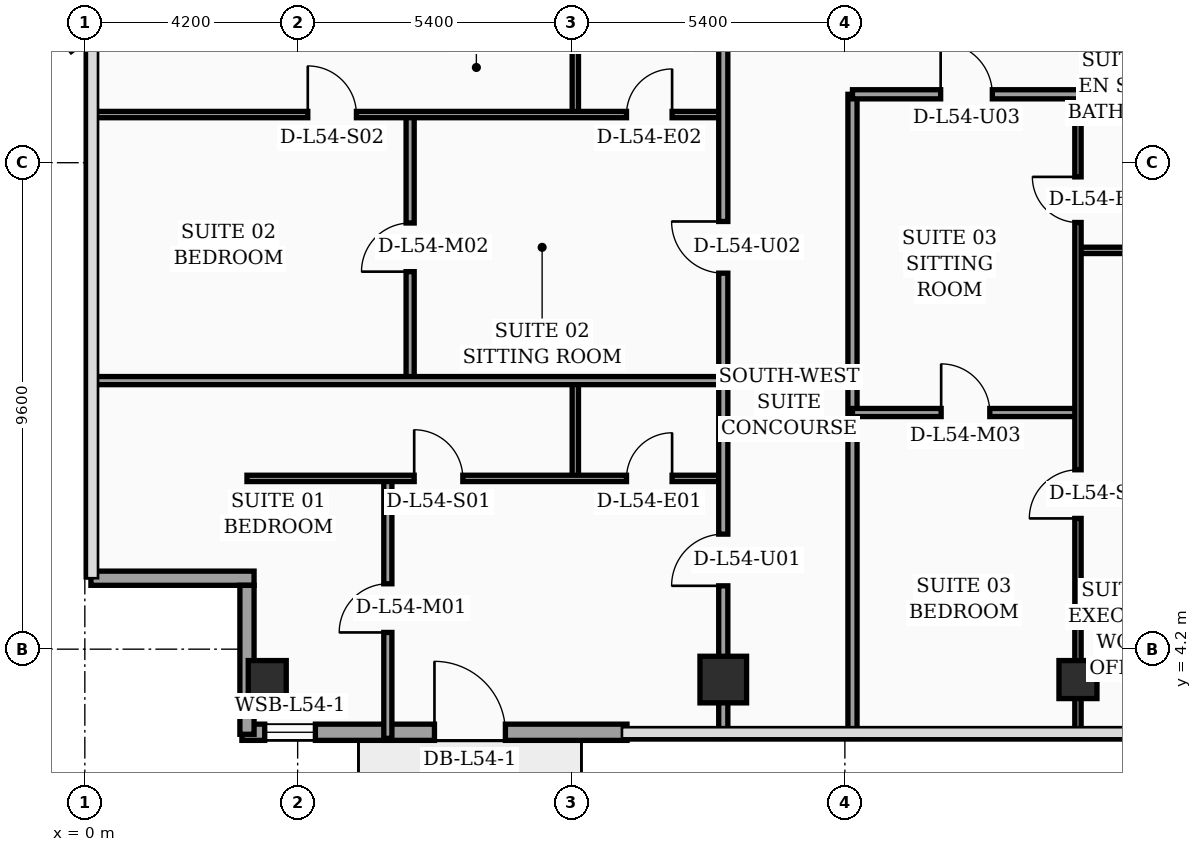
"""IFC4 building model, lengths in metres.
Left out: names, types, materials, properties, quantities, classifications, styles, units other than length and angle.
Written with IfcOpenShell. Run it as: python <this file> out.ifc"""

import sys

from ifc_helpers import new_model, si_unit, direction, frame, frame_2d, origin, origin_2d, place, context, subcontext, project, spatial, rectangle, hollow_rectangle, extrude, element, fill, save


model = new_model("IFC4")
c1 = context("Model", 3, precision=1e-05, world=origin(), true_north=direction((0.0, 1.0)))
c2 = subcontext(c1, "Body", "Model", "MODEL_VIEW")
j1 = project(units=[si_unit("LENGTHUNIT", "METRE"), si_unit("PLANEANGLEUNIT", "RADIAN")], contexts=[c1])
p1 = place(None, origin())
s1 = spatial("IfcSite", under=j1, at=p1, CompositionType="ELEMENT")
p2 = place(p1, origin())
s2 = spatial("IfcBuilding", under=s1, at=p2, CompositionType="ELEMENT")
p3 = place(p2, frame((0.0, 0.0, 219.3)))
s3 = spatial("IfcBuildingStorey", under=s2, at=p3, CompositionType="ELEMENT", Elevation=219.3)
p4 = place(p3, frame((3.6, 3.6, 0.0), z_axis=(0.0, 0.0, 1.0), x_axis=(1.0, 0.0, 0.0)))
e1 = element("IfcColumn", 1, at=p4, inside=s3, PredefinedType="COLUMN", context=c2, shape_type="SweptSolid", body=[
    extrude(hollow_rectangle(XDim=0.75, YDim=0.75, WallThickness=0.032, at=origin_2d()), origin(), (0.0, 0.0, 1.0), 3.56),
])
p5 = place(p3, frame((12.6, 3.6, 0.0), z_axis=(0.0, 0.0, 1.0), x_axis=(1.0, 0.0, 0.0)))
e2 = element("IfcColumn", 2, at=p5, inside=s3, PredefinedType="COLUMN", context=c2, shape_type="SweptSolid", body=[
    extrude(rectangle(XDim=0.92, YDim=0.92, at=origin_2d()), origin(), (0.0, 0.0, 1.0), 3.56),
])
p6 = place(p3, frame((19.6, 3.6, 0.0), z_axis=(0.0, 0.0, 1.0), x_axis=(1.0, 0.0, 0.0)))
e3 = element("IfcColumn", 3, at=p6, inside=s3, PredefinedType="COLUMN", context=c2, shape_type="SweptSolid", body=[
    extrude(hollow_rectangle(XDim=0.75, YDim=0.75, WallThickness=0.032, at=origin_2d()), origin(), (0.0, 0.0, 1.0), 3.56),
])
p7 = place(p3, frame((3.1, 2.56, 0.0), z_axis=(0.0, 0.0, 1.0), x_axis=(1.0, 0.0, 0.0)))
e4 = element("IfcWall", 4, at=p7, inside=s3, PredefinedType="SOLIDWALL", context=c2, shape_type="SweptSolid", body=[
    extrude(rectangle(XDim=7.6, YDim=0.32, at=frame_2d((3.8, 0.0))), origin(), (0.0, 0.0, 1.0), 3.56),
])
p8 = place(p7, frame((0.45, 0.0, 0.75)))
e5 = element("IfcOpeningElement", 5, at=p8, cuts=e4, PredefinedType="OPENING", context=c2, shape_type="SweptSolid", body=[
    extrude(rectangle(XDim=1.0, YDim=1.6, at=frame_2d((0.5, 0.8))), frame((0.0, 0.17, 0.0), z_axis=(0.0, -1.0, 0.0), x_axis=(1.0, 0.0, 0.0)), (0.0, 0.0, 1.0), 0.34),
])
p9 = place(p7, frame((3.8, 0.0, 0.0)))
e6 = element("IfcOpeningElement", 6, at=p9, cuts=e4, PredefinedType="OPENING", context=c2, shape_type="SweptSolid", body=[
    extrude(rectangle(XDim=1.4, YDim=2.25, at=frame_2d((0.7, 1.125))), frame((0.0, 0.17, 0.0), z_axis=(0.0, -1.0, 0.0), x_axis=(1.0, 0.0, 0.0)), (0.0, 0.0, 1.0), 0.34),
])
p10 = place(p3, frame((0.12, 5.6, 0.0), z_axis=(0.0, 0.0, 1.0), x_axis=(1.0, 0.0, 0.0)))
e7 = element("IfcWall", 7, at=p10, inside=s3, PredefinedType="SOLIDWALL", context=c2, shape_type="SweptSolid", body=[
    extrude(rectangle(XDim=3.22, YDim=0.28, at=frame_2d((1.61, 0.0))), origin(), (0.0, 0.0, 1.0), 2.94),
])
p11 = place(p3, frame((3.2, 5.46, 0.0), z_axis=(0.0, 0.0, 1.0), x_axis=(0.0, -1.0, 0.0)))
e8 = element("IfcWall", 8, at=p11, inside=s3, PredefinedType="SOLIDWALL", context=c2, shape_type="SweptSolid", body=[
    extrude(rectangle(XDim=2.94, YDim=0.28, at=frame_2d((1.47, 0.0))), origin(), (0.0, 0.0, 1.0), 2.94),
])
p12 = place(p3, frame((9.68, 7.57, 0.0), z_axis=(0.0, 0.0, 1.0), x_axis=(0.0, 1.0, 0.0)))
e9 = element("IfcWall", 9, at=p12, inside=s3, PredefinedType="PARTITIONING", context=c2, shape_type="SweptSolid", body=[
    extrude(rectangle(XDim=1.93, YDim=0.125, at=frame_2d((0.965, 0.0))), origin(), (0.0, 0.0, 1.0), 3.09),
])
p13 = place(p3, frame((5.98, 2.44, 0.0), z_axis=(0.0, 0.0, 1.0), x_axis=(0.0, 1.0, 0.0)))
e10 = element("IfcWall", 10, at=p13, inside=s3, PredefinedType="PARTITIONING", context=c2, shape_type="SweptSolid", body=[
    extrude(rectangle(XDim=5.13, YDim=0.16, at=frame_2d((2.565, 0.0))), origin(), (0.0, 0.0, 1.0), 3.09),
])
p14 = place(p13, frame((2.09, 0.0, 0.0)))
e11 = element("IfcOpeningElement", 11, at=p14, cuts=e10, PredefinedType="OPENING", context=c2, shape_type="SweptSolid", body=[
    extrude(rectangle(XDim=0.96, YDim=2.2, at=frame_2d((0.48, 1.1))), frame((0.0, 0.09, 0.0), z_axis=(0.0, -1.0, 0.0), x_axis=(1.0, 0.0, 0.0)), (0.0, 0.0, 1.0), 0.18),
])
p15 = place(p3, frame((3.2, 7.57, 0.0), z_axis=(0.0, 0.0, 1.0), x_axis=(1.0, 0.0, 0.0)))
e12 = element("IfcWall", 12, at=p15, inside=s3, PredefinedType="PARTITIONING", context=c2, shape_type="SweptSolid", body=[
    extrude(rectangle(XDim=9.4, YDim=0.125, at=frame_2d((4.7, 0.0))), origin(), (0.0, 0.0, 1.0), 2.94),
])
p16 = place(p15, frame((3.3, 0.0, 0.0)))
e13 = element("IfcOpeningElement", 13, at=p16, cuts=e12, PredefinedType="OPENING", context=c2, shape_type="SweptSolid", body=[
    extrude(rectangle(XDim=0.96, YDim=2.2, at=frame_2d((0.48, 1.1))), frame((0.0, 0.073, 0.0), z_axis=(0.0, -1.0, 0.0), x_axis=(1.0, 0.0, 0.0)), (0.0, 0.0, 1.0), 0.145),
])
p17 = place(p15, frame((7.49, 0.0, 0.0)))
e14 = element("IfcOpeningElement", 14, at=p17, cuts=e12, PredefinedType="OPENING", context=c2, shape_type="SweptSolid", body=[
    extrude(rectangle(XDim=0.9, YDim=2.15, at=frame_2d((0.45, 1.075))), frame((0.0, 0.073, 0.0), z_axis=(0.0, -1.0, 0.0), x_axis=(1.0, 0.0, 0.0)), (0.0, 0.0, 1.0), 0.145),
])
p18 = place(p3, frame((9.68, 14.75, 0.0), z_axis=(0.0, 0.0, 1.0), x_axis=(0.0, 1.0, 0.0)))
e15 = element("IfcWall", 15, at=p18, inside=s3, PredefinedType="PARTITIONING", context=c2, shape_type="SweptSolid", body=[
    extrude(rectangle(XDim=2.05, YDim=0.125, at=frame_2d((1.025, 0.0))), origin(), (0.0, 0.0, 1.0), 3.56),
])
p19 = place(p3, frame((6.42, 9.5, 0.0), z_axis=(0.0, 0.0, 1.0), x_axis=(0.0, 1.0, 0.0)))
e16 = element("IfcWall", 16, at=p19, inside=s3, PredefinedType="PARTITIONING", context=c2, shape_type="SweptSolid", body=[
    extrude(rectangle(XDim=5.25, YDim=0.16, at=frame_2d((2.625, 0.0))), origin(), (0.0, 0.0, 1.0), 3.14),
])
p20 = place(p19, frame((2.15, 0.0, 0.0)))
e17 = element("IfcOpeningElement", 17, at=p20, cuts=e16, PredefinedType="OPENING", context=c2, shape_type="SweptSolid", body=[
    extrude(rectangle(XDim=0.96, YDim=2.2, at=frame_2d((0.48, 1.1))), frame((0.0, 0.09, 0.0), z_axis=(0.0, -1.0, 0.0), x_axis=(1.0, 0.0, 0.0)), (0.0, 0.0, 1.0), 0.18),
])
p21 = place(p3, frame((0.08, 14.75, 0.0), z_axis=(0.0, 0.0, 1.0), x_axis=(1.0, 0.0, 0.0)))
e18 = element("IfcWall", 18, at=p21, inside=s3, PredefinedType="PARTITIONING", context=c2, shape_type="SweptSolid", body=[
    extrude(rectangle(XDim=12.52, YDim=0.125, at=frame_2d((6.26, 0.0))), origin(), (0.0, 0.0, 1.0), 2.94),
])
p22 = place(p21, frame((4.32, 0.0, 0.0)))
e19 = element("IfcOpeningElement", 19, at=p22, cuts=e18, PredefinedType="OPENING", context=c2, shape_type="SweptSolid", body=[
    extrude(rectangle(XDim=0.96, YDim=2.2, at=frame_2d((0.48, 1.1))), frame((0.0, 0.073, 0.0), z_axis=(0.0, -1.0, 0.0), x_axis=(1.0, 0.0, 0.0)), (0.0, 0.0, 1.0), 0.145),
])
p23 = place(p21, frame((10.61, 0.0, 0.0)))
e20 = element("IfcOpeningElement", 20, at=p23, cuts=e18, PredefinedType="OPENING", context=c2, shape_type="SweptSolid", body=[
    extrude(rectangle(XDim=0.9, YDim=2.15, at=frame_2d((0.45, 1.075))), frame((0.0, 0.073, 0.0), z_axis=(0.0, -1.0, 0.0), x_axis=(1.0, 0.0, 0.0)), (0.0, 0.0, 1.0), 0.145),
])
p24 = place(p3, frame((0.08, 9.5, 0.0), z_axis=(0.0, 0.0, 1.0), x_axis=(1.0, 0.0, 0.0)))
e21 = element("IfcWall", 21, at=p24, inside=s3, PredefinedType="PARTITIONING", context=c2, shape_type="SweptSolid", body=[
    extrude(rectangle(XDim=12.52, YDim=0.16, at=frame_2d((6.26, 0.0))), origin(), (0.0, 0.0, 1.0), 2.94),
])
p25 = place(p3, frame((12.6, 2.44, 0.0), z_axis=(0.0, 0.0, 1.0), x_axis=(0.0, 1.0, 0.0)))
e22 = element("IfcWall", 22, at=p25, inside=s3, PredefinedType="PARTITIONING", context=c2, shape_type="SweptSolid", body=[
    extrude(rectangle(XDim=14.36, YDim=0.18, at=frame_2d((7.18, 0.0))), origin(), (0.0, 0.0, 1.0), 2.94),
])
p26 = place(p25, frame((3.01, 0.0, 0.0)))
e23 = element("IfcOpeningElement", 23, at=p26, cuts=e22, PredefinedType="OPENING", context=c2, shape_type="SweptSolid", body=[
    extrude(rectangle(XDim=1.02, YDim=2.2, at=frame_2d((0.51, 1.1))), frame((0.0, 0.1, 0.0), z_axis=(0.0, -1.0, 0.0), x_axis=(1.0, 0.0, 0.0)), (0.0, 0.0, 1.0), 0.2),
])
p27 = place(p25, frame((9.18, 0.0, 0.0)))
e24 = element("IfcOpeningElement", 24, at=p27, cuts=e22, PredefinedType="OPENING", context=c2, shape_type="SweptSolid", body=[
    extrude(rectangle(XDim=1.02, YDim=2.2, at=frame_2d((0.51, 1.1))), frame((0.0, 0.1, 0.0), z_axis=(0.0, -1.0, 0.0), x_axis=(1.0, 0.0, 0.0)), (0.0, 0.0, 1.0), 0.2),
])
p28 = place(p3, frame((15.15, 2.44, 0.0), z_axis=(0.0, 0.0, 1.0), x_axis=(0.0, 1.0, 0.0)))
e25 = element("IfcWall", 25, at=p28, inside=s3, PredefinedType="PARTITIONING", context=c2, shape_type="SweptSolid", body=[
    extrude(rectangle(XDim=12.71, YDim=0.18, at=frame_2d((6.355, 0.0))), origin(), (0.0, 0.0, 1.0), 3.09),
])
p29 = place(p3, frame((19.6, 12.07, 0.0), z_axis=(0.0, 0.0, 1.0), x_axis=(1.0, 0.0, 0.0)))
e26 = element("IfcWall", 26, at=p29, inside=s3, PredefinedType="PARTITIONING", context=c2, shape_type="SweptSolid", body=[
    extrude(rectangle(XDim=2.0, YDim=0.125, at=frame_2d((1.0, 0.0))), origin(), (0.0, 0.0, 1.0), 3.56),
])
p30 = place(p3, frame((15.15, 8.87, 0.0), z_axis=(0.0, 0.0, 1.0), x_axis=(1.0, 0.0, 0.0)))
e27 = element("IfcWall", 27, at=p30, inside=s3, PredefinedType="PARTITIONING", context=c2, shape_type="SweptSolid", body=[
    extrude(rectangle(XDim=4.45, YDim=0.16, at=frame_2d((2.225, 0.0))), origin(), (0.0, 0.0, 1.0), 3.56),
])
p31 = place(p30, frame((1.75, 0.0, 0.0)))
e28 = element("IfcOpeningElement", 28, at=p31, cuts=e27, PredefinedType="OPENING", context=c2, shape_type="SweptSolid", body=[
    extrude(rectangle(XDim=0.96, YDim=2.2, at=frame_2d((0.48, 1.1))), frame((0.0, 0.09, 0.0), z_axis=(0.0, -1.0, 0.0), x_axis=(1.0, 0.0, 0.0)), (0.0, 0.0, 1.0), 0.18),
])
p32 = place(p3, frame((19.6, 2.44, 0.0), z_axis=(0.0, 0.0, 1.0), x_axis=(0.0, 1.0, 0.0)))
e29 = element("IfcWall", 29, at=p32, inside=s3, PredefinedType="PARTITIONING", context=c2, shape_type="SweptSolid", body=[
    extrude(rectangle(XDim=12.71, YDim=0.125, at=frame_2d((6.355, 0.0))), origin(), (0.0, 0.0, 1.0), 2.59),
])
p33 = place(p32, frame((4.34, 0.0, 0.0)))
e30 = element("IfcOpeningElement", 30, at=p33, cuts=e29, PredefinedType="OPENING", context=c2, shape_type="SweptSolid", body=[
    extrude(rectangle(XDim=0.96, YDim=2.2, at=frame_2d((0.48, 1.1))), frame((0.0, 0.073, 0.0), z_axis=(0.0, -1.0, 0.0), x_axis=(1.0, 0.0, 0.0)), (0.0, 0.0, 1.0), 0.145),
])
p34 = place(p32, frame((10.18, 0.0, 0.0)))
e31 = element("IfcOpeningElement", 31, at=p34, cuts=e29, PredefinedType="OPENING", context=c2, shape_type="SweptSolid", body=[
    extrude(rectangle(XDim=0.9, YDim=2.15, at=frame_2d((0.45, 1.075))), frame((0.0, 0.073, 0.0), z_axis=(0.0, -1.0, 0.0), x_axis=(1.0, 0.0, 0.0)), (0.0, 0.0, 1.0), 0.145),
])
p35 = place(p3, frame((15.15, 15.15, 0.0), z_axis=(0.0, 0.0, 1.0), x_axis=(1.0, 0.0, 0.0)))
e32 = element("IfcWall", 32, at=p35, inside=s3, PredefinedType="PARTITIONING", context=c2, shape_type="SweptSolid", body=[
    extrude(rectangle(XDim=6.45, YDim=0.18, at=frame_2d((3.225, 0.0))), origin(), (0.0, 0.0, 1.0), 2.59),
])
p36 = place(p35, frame((1.74, 0.0, 0.0)))
e33 = element("IfcOpeningElement", 33, at=p36, cuts=e32, PredefinedType="OPENING", context=c2, shape_type="SweptSolid", body=[
    extrude(rectangle(XDim=1.02, YDim=2.2, at=frame_2d((0.51, 1.1))), frame((0.0, 0.1, 0.0), z_axis=(0.0, -1.0, 0.0), x_axis=(1.0, 0.0, 0.0)), (0.0, 0.0, 1.0), 0.2),
])
p37 = place(p8, origin())
e34 = element("IfcWindow", 34, at=p37, inside=s3, PartitioningType="SINGLE_PANEL", PredefinedType="WINDOW", context=c2, shape_type="SweptSolid", body=[
    extrude(rectangle(XDim=1.0, YDim=1.6, at=frame_2d((0.5, 0.8))), frame((0.0, 0.03, 0.0), z_axis=(0.0, -1.0, 0.0), x_axis=(1.0, 0.0, 0.0)), (0.0, 0.0, 1.0), 0.06),
])
fill(e5, e34)
p38 = place(p9, origin())
e35 = element("IfcDoor", 35, at=p38, inside=s3, OperationType="SINGLE_SWING_LEFT", PredefinedType="DOOR", context=c2, shape_type="SweptSolid", body=[
    extrude(rectangle(XDim=1.4, YDim=2.25, at=frame_2d((0.7, 1.125))), frame((0.0, 0.025, 0.0), z_axis=(0.0, -1.0, 0.0), x_axis=(1.0, 0.0, 0.0)), (0.0, 0.0, 1.0), 0.05),
])
fill(e6, e35)
p39 = place(p14, origin())
e36 = element("IfcDoor", 36, at=p39, inside=s3, OperationType="SINGLE_SWING_LEFT", PredefinedType="DOOR", context=c2, shape_type="SweptSolid", body=[
    extrude(rectangle(XDim=0.96, YDim=2.2, at=frame_2d((0.48, 1.1))), frame((0.0, 0.025, 0.0), z_axis=(0.0, -1.0, 0.0), x_axis=(1.0, 0.0, 0.0)), (0.0, 0.0, 1.0), 0.05),
])
fill(e11, e36)
p40 = place(p16, origin())
e37 = element("IfcDoor", 37, at=p40, inside=s3, OperationType="SINGLE_SWING_LEFT", PredefinedType="DOOR", context=c2, shape_type="SweptSolid", body=[
    extrude(rectangle(XDim=0.96, YDim=2.2, at=frame_2d((0.48, 1.1))), frame((0.0, 0.025, 0.0), z_axis=(0.0, -1.0, 0.0), x_axis=(1.0, 0.0, 0.0)), (0.0, 0.0, 1.0), 0.05),
])
fill(e13, e37)
p41 = place(p17, origin())
e38 = element("IfcDoor", 38, at=p41, inside=s3, OperationType="SINGLE_SWING_RIGHT", PredefinedType="DOOR", context=c2, shape_type="SweptSolid", body=[
    extrude(rectangle(XDim=0.9, YDim=2.15, at=frame_2d((0.45, 1.075))), frame((0.0, 0.025, 0.0), z_axis=(0.0, -1.0, 0.0), x_axis=(1.0, 0.0, 0.0)), (0.0, 0.0, 1.0), 0.05),
])
fill(e14, e38)
p42 = place(p20, origin())
e39 = element("IfcDoor", 39, at=p42, inside=s3, OperationType="SINGLE_SWING_LEFT", PredefinedType="DOOR", context=c2, shape_type="SweptSolid", body=[
    extrude(rectangle(XDim=0.96, YDim=2.2, at=frame_2d((0.48, 1.1))), frame((0.0, 0.025, 0.0), z_axis=(0.0, -1.0, 0.0), x_axis=(1.0, 0.0, 0.0)), (0.0, 0.0, 1.0), 0.05),
])
fill(e17, e39)
p43 = place(p22, origin())
e40 = element("IfcDoor", 40, at=p43, inside=s3, OperationType="SINGLE_SWING_LEFT", PredefinedType="DOOR", context=c2, shape_type="SweptSolid", body=[
    extrude(rectangle(XDim=0.96, YDim=2.2, at=frame_2d((0.48, 1.1))), frame((0.0, 0.025, 0.0), z_axis=(0.0, -1.0, 0.0), x_axis=(1.0, 0.0, 0.0)), (0.0, 0.0, 1.0), 0.05),
])
fill(e19, e40)
p44 = place(p23, origin())
e41 = element("IfcDoor", 41, at=p44, inside=s3, OperationType="SINGLE_SWING_RIGHT", PredefinedType="DOOR", context=c2, shape_type="SweptSolid", body=[
    extrude(rectangle(XDim=0.9, YDim=2.15, at=frame_2d((0.45, 1.075))), frame((0.0, 0.025, 0.0), z_axis=(0.0, -1.0, 0.0), x_axis=(1.0, 0.0, 0.0)), (0.0, 0.0, 1.0), 0.05),
])
fill(e20, e41)
p45 = place(p26, origin())
e42 = element("IfcDoor", 42, at=p45, inside=s3, OperationType="SINGLE_SWING_LEFT", PredefinedType="DOOR", context=c2, shape_type="SweptSolid", body=[
    extrude(rectangle(XDim=1.02, YDim=2.2, at=frame_2d((0.51, 1.1))), frame((0.0, 0.025, 0.0), z_axis=(0.0, -1.0, 0.0), x_axis=(1.0, 0.0, 0.0)), (0.0, 0.0, 1.0), 0.05),
])
fill(e23, e42)
p46 = place(p27, origin())
e43 = element("IfcDoor", 43, at=p46, inside=s3, OperationType="SINGLE_SWING_RIGHT", PredefinedType="DOOR", context=c2, shape_type="SweptSolid", body=[
    extrude(rectangle(XDim=1.02, YDim=2.2, at=frame_2d((0.51, 1.1))), frame((0.0, 0.025, 0.0), z_axis=(0.0, -1.0, 0.0), x_axis=(1.0, 0.0, 0.0)), (0.0, 0.0, 1.0), 0.05),
])
fill(e24, e43)
p47 = place(p31, origin())
e44 = element("IfcDoor", 44, at=p47, inside=s3, OperationType="SINGLE_SWING_LEFT", PredefinedType="DOOR", context=c2, shape_type="SweptSolid", body=[
    extrude(rectangle(XDim=0.96, YDim=2.2, at=frame_2d((0.48, 1.1))), frame((0.0, 0.025, 0.0), z_axis=(0.0, -1.0, 0.0), x_axis=(1.0, 0.0, 0.0)), (0.0, 0.0, 1.0), 0.05),
])
fill(e28, e44)
p48 = place(p33, origin())
e45 = element("IfcDoor", 45, at=p48, inside=s3, OperationType="SINGLE_SWING_LEFT", PredefinedType="DOOR", context=c2, shape_type="SweptSolid", body=[
    extrude(rectangle(XDim=0.96, YDim=2.2, at=frame_2d((0.48, 1.1))), frame((0.0, 0.025, 0.0), z_axis=(0.0, -1.0, 0.0), x_axis=(1.0, 0.0, 0.0)), (0.0, 0.0, 1.0), 0.05),
])
fill(e30, e45)
p49 = place(p34, origin())
e46 = element("IfcDoor", 46, at=p49, inside=s3, OperationType="SINGLE_SWING_RIGHT", PredefinedType="DOOR", context=c2, shape_type="SweptSolid", body=[
    extrude(rectangle(XDim=0.9, YDim=2.15, at=frame_2d((0.45, 1.075))), frame((0.0, 0.025, 0.0), z_axis=(0.0, -1.0, 0.0), x_axis=(1.0, 0.0, 0.0)), (0.0, 0.0, 1.0), 0.05),
])
fill(e31, e46)
p50 = place(p36, origin())
e47 = element("IfcDoor", 47, at=p50, inside=s3, OperationType="SINGLE_SWING_LEFT", PredefinedType="DOOR", context=c2, shape_type="SweptSolid", body=[
    extrude(rectangle(XDim=1.02, YDim=2.2, at=frame_2d((0.51, 1.1))), frame((0.0, 0.025, 0.0), z_axis=(0.0, -1.0, 0.0), x_axis=(1.0, 0.0, 0.0)), (0.0, 0.0, 1.0), 0.05),
])
fill(e33, e47)
save(model, sys.argv[1])
